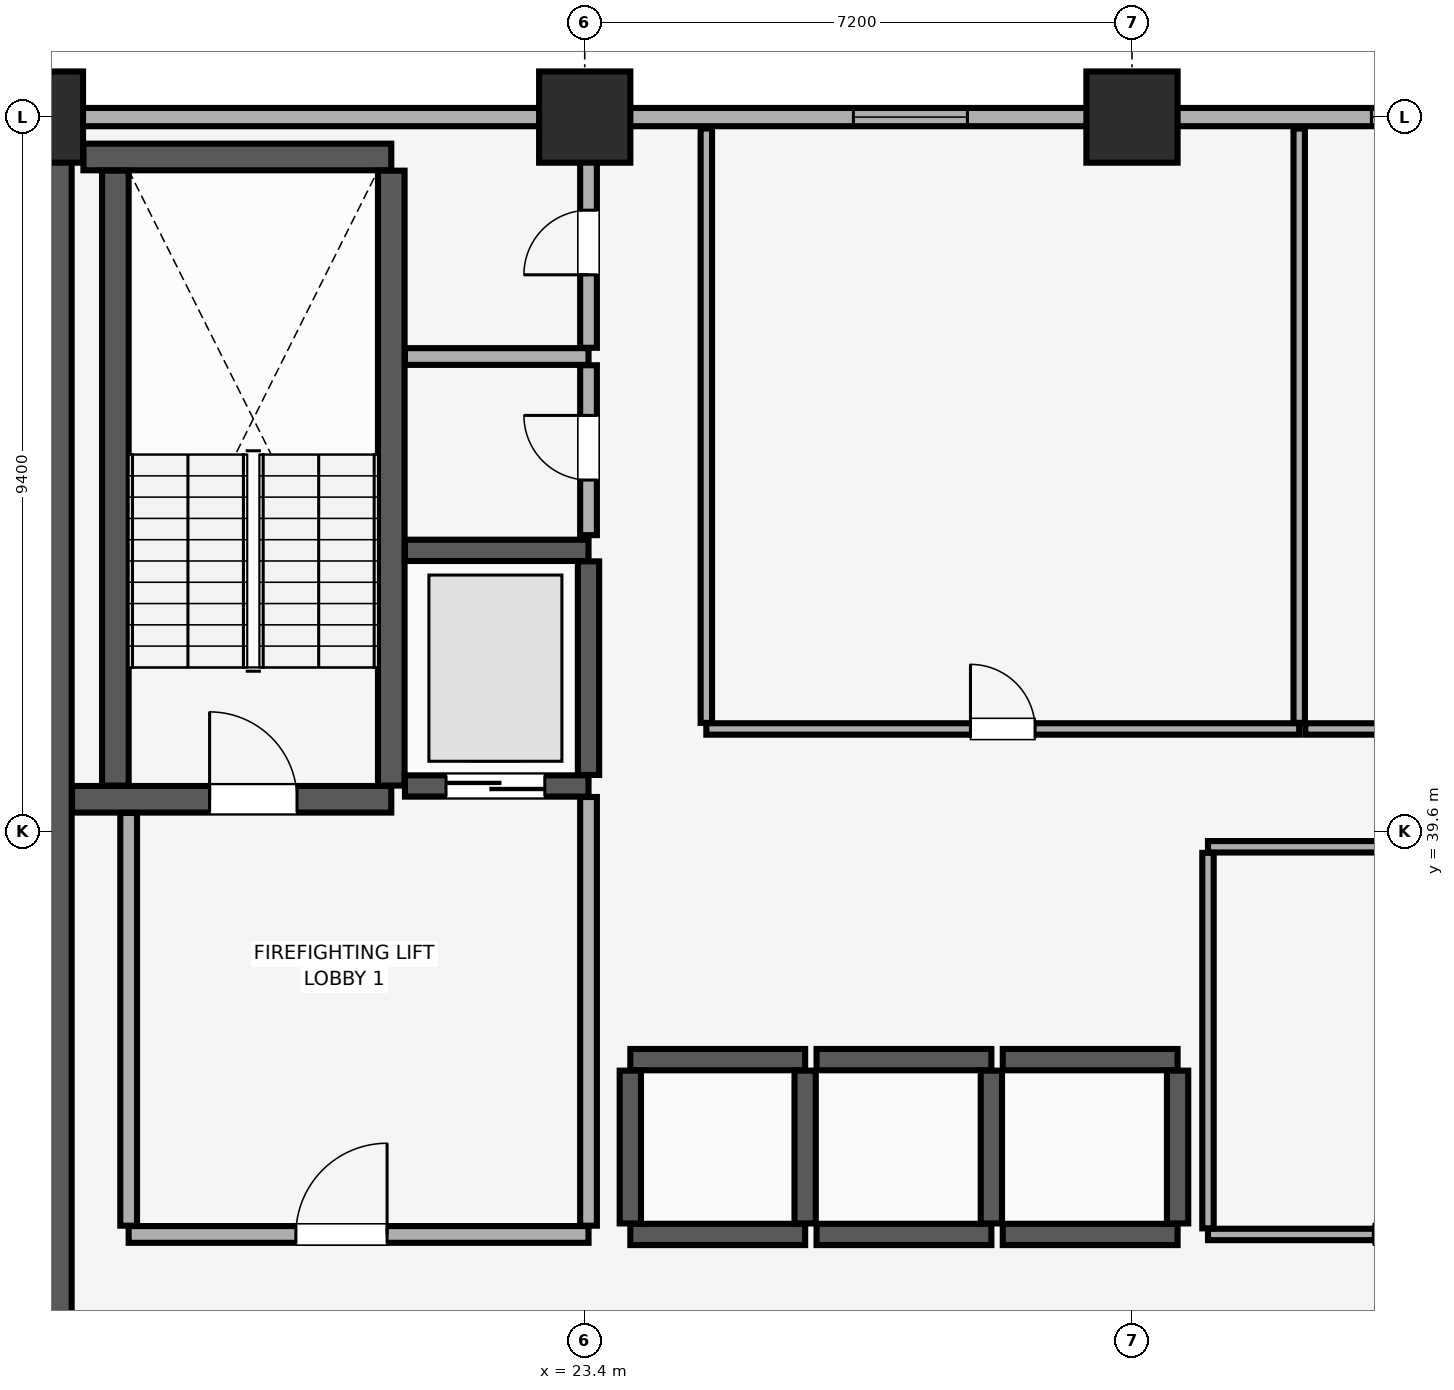
"""IFC4 building model, lengths in metres.
Left out: names, types, materials, properties, quantities, classifications, styles, units other than length and angle.
Written with IfcOpenShell. Run it as: python <this file> out.ifc"""

import sys

from ifc_helpers import new_model, si_unit, direction, frame, frame_2d, origin, origin_2d, place, context, subcontext, project, spatial, rectangle, extrude, element, fill, save


model = new_model("IFC4")
c1 = context("Model", 3, precision=1e-05, world=origin(), true_north=direction((0.0, 1.0)))
c2 = subcontext(c1, "Body", "Model", "MODEL_VIEW")
j1 = project(units=[si_unit("LENGTHUNIT", "METRE"), si_unit("PLANEANGLEUNIT", "RADIAN")], contexts=[c1])
p1 = place(None, origin())
s1 = spatial("IfcSite", under=j1, at=p1, CompositionType="ELEMENT")
p2 = place(p1, origin())
s2 = spatial("IfcBuilding", under=s1, at=p2, CompositionType="ELEMENT")
p3 = place(p2, frame((0.0, 0.0, 135.35)))
s3 = spatial("IfcBuildingStorey", under=s2, at=p3, CompositionType="ELEMENT", Elevation=135.35)
for number, where, z_axis, x_axis in (
    (1, (16.2, 49.0, 0.0), (0.0, 0.0, 1.0), (1.0, 0.0, 0.0)),
    (2, (23.4, 49.0, 0.0), (0.0, 0.0, 1.0), (1.0, 0.0, 0.0)),
    (3, (30.6, 49.0, 0.0), (0.0, 0.0, 1.0), (1.0, 0.0, 0.0)),
):
    element("IfcColumn", number, at=place(p3, frame(where, z_axis=z_axis, x_axis=x_axis)), inside=s3, PredefinedType="COLUMN", context=c2, shape_type="SweptSolid", body=[
        extrude(rectangle(XDim=1.2, YDim=1.2, at=origin_2d()), origin(), (0.0, 0.0, 1.0), 3.56),
    ])
p4 = place(p3, frame((77.0, 49.0, 0.0), z_axis=(0.0, 0.0, 1.0), x_axis=(-1.0, 0.0, 0.0)))
e4 = element("IfcWall", 4, at=p4, inside=s3, PredefinedType="SOLIDWALL", context=c2, shape_type="SweptSolid", body=[
    extrude(rectangle(XDim=70.0, YDim=0.24, at=frame_2d((35.0, 0.0))), origin(), (0.0, 0.0, 1.0), 2.61),
])
p5 = place(p4, frame((63.7, 0.0, 0.85)))
e5 = element("IfcOpeningElement", 5, at=p5, cuts=e4, PredefinedType="OPENING", context=c2, shape_type="SweptSolid", body=[
    extrude(rectangle(XDim=3.0, YDim=1.5, at=frame_2d((1.5, 0.75))), frame((0.0, 0.13, 0.0), z_axis=(0.0, -1.0, 0.0), x_axis=(1.0, 0.0, 0.0)), (0.0, 0.0, 1.0), 0.26),
])
p6 = place(p4, frame((3.3, 0.0, 0.85)))
e6 = element("IfcOpeningElement", 6, at=p6, cuts=e4, PredefinedType="OPENING", context=c2, shape_type="SweptSolid", body=[
    extrude(rectangle(XDim=3.0, YDim=1.5, at=frame_2d((1.5, 0.75))), frame((0.0, 0.13, 0.0), z_axis=(0.0, -1.0, 0.0), x_axis=(1.0, 0.0, 0.0)), (0.0, 0.0, 1.0), 0.26),
])
p7 = place(p4, frame((48.565, 0.0, 0.9)))
e7 = element("IfcOpeningElement", 7, at=p7, cuts=e4, PredefinedType="OPENING", context=c2, shape_type="SweptSolid", body=[
    extrude(rectangle(XDim=1.5, YDim=1.4, at=frame_2d((0.75, 0.7))), frame((0.0, 0.13, 0.0), z_axis=(0.0, -1.0, 0.0), x_axis=(1.0, 0.0, 0.0)), (0.0, 0.0, 1.0), 0.26),
])
p8 = place(p4, frame((41.75, 0.0, 0.9)))
e8 = element("IfcOpeningElement", 8, at=p8, cuts=e4, PredefinedType="OPENING", context=c2, shape_type="SweptSolid", body=[
    extrude(rectangle(XDim=1.5, YDim=1.4, at=frame_2d((0.75, 0.7))), frame((0.0, 0.13, 0.0), z_axis=(0.0, -1.0, 0.0), x_axis=(1.0, 0.0, 0.0)), (0.0, 0.0, 1.0), 0.26),
])
p9 = place(p4, frame((25.3, 0.0, 0.9)))
e9 = element("IfcOpeningElement", 9, at=p9, cuts=e4, PredefinedType="OPENING", context=c2, shape_type="SweptSolid", body=[
    extrude(rectangle(XDim=1.5, YDim=1.4, at=frame_2d((0.75, 0.7))), frame((0.0, 0.13, 0.0), z_axis=(0.0, -1.0, 0.0), x_axis=(1.0, 0.0, 0.0)), (0.0, 0.0, 1.0), 0.26),
])
p10 = place(p4, frame((20.685, 0.0, 0.9)))
e10 = element("IfcOpeningElement", 10, at=p10, cuts=e4, PredefinedType="OPENING", context=c2, shape_type="SweptSolid", body=[
    extrude(rectangle(XDim=1.5, YDim=1.4, at=frame_2d((0.75, 0.7))), frame((0.0, 0.13, 0.0), z_axis=(0.0, -1.0, 0.0), x_axis=(1.0, 0.0, 0.0)), (0.0, 0.0, 1.0), 0.26),
])
p11 = place(p3, frame((16.2, 29.4, 0.0), z_axis=(0.0, 0.0, 1.0), x_axis=(0.0, 1.0, 0.0)))
e11 = element("IfcWall", 11, at=p11, inside=s3, PredefinedType="SHEAR", context=c2, shape_type="SweptSolid", body=[
    extrude(rectangle(XDim=19.2, YDim=0.9, at=frame_2d((9.6, 0.0))), origin(), (0.0, 0.0, 1.0), 3.56),
])
p12 = place(p3, frame((16.655, 40.025, 0.0), z_axis=(0.0, 0.0, 1.0), x_axis=(1.0, 0.0, 0.0)))
e12 = element("IfcWall", 12, at=p12, inside=s3, PredefinedType="SHEAR", context=c2, shape_type="SweptSolid", body=[
    extrude(rectangle(XDim=4.2, YDim=0.35, at=frame_2d((2.1, 0.0))), origin(), (0.0, 0.0, 1.0), 3.56),
])
p13 = place(p12, frame((1.81, 0.0, 0.0)))
e13 = element("IfcOpeningElement", 13, at=p13, cuts=e12, PredefinedType="OPENING", context=c2, shape_type="SweptSolid", body=[
    extrude(rectangle(XDim=1.15, YDim=2.15, at=frame_2d((0.575, 1.075))), frame((0.0, 0.185, 0.0), z_axis=(0.0, -1.0, 0.0), x_axis=(1.0, 0.0, 0.0)), (0.0, 0.0, 1.0), 0.37),
])
p14 = place(p3, frame((16.805, 48.475, 0.0), z_axis=(0.0, 0.0, 1.0), x_axis=(1.0, 0.0, 0.0)))
e14 = element("IfcWall", 14, at=p14, inside=s3, PredefinedType="SHEAR", context=c2, shape_type="SweptSolid", body=[
    extrude(rectangle(XDim=4.05, YDim=0.35, at=frame_2d((2.025, 0.0))), origin(), (0.0, 0.0, 1.0), 3.56),
])
for number, where, z_axis, x_axis in (
    (15, (17.225, 40.205, 0.0), (0.0, 0.0, 1.0), (0.0, 1.0, 0.0)),
    (16, (20.855, 40.205, 0.0), (0.0, 0.0, 1.0), (0.0, 1.0, 0.0)),
):
    element("IfcWall", number, at=place(p3, frame(where, z_axis=z_axis, x_axis=x_axis)), inside=s3, PredefinedType="SHEAR", context=c2, shape_type="SweptSolid", body=[
        extrude(rectangle(XDim=8.09, YDim=0.35, at=frame_2d((4.045, 0.0))), origin(), (0.0, 0.0, 1.0), 3.56),
    ])
for number, where, z_axis, x_axis in (
    (17, (24.0, 34.3, 0.0), (0.0, 0.0, 1.0), (1.0, 0.0, 0.0)),
    (18, (24.0, 36.6, 0.0), (0.0, 0.0, 1.0), (1.0, 0.0, 0.0)),
):
    element("IfcWall", number, at=place(p3, frame(where, z_axis=z_axis, x_axis=x_axis)), inside=s3, PredefinedType="SHEAR", context=c2, shape_type="SweptSolid", body=[
        extrude(rectangle(XDim=2.3, YDim=0.28, at=frame_2d((1.15, 0.0))), origin(), (0.0, 0.0, 1.0), 3.56),
    ])
for number, where, z_axis, x_axis in (
    (19, (24.0, 34.445, 0.0), (0.0, 0.0, 1.0), (0.0, 1.0, 0.0)),
    (20, (26.3, 34.445, 0.0), (0.0, 0.0, 1.0), (0.0, 1.0, 0.0)),
):
    element("IfcWall", number, at=place(p3, frame(where, z_axis=z_axis, x_axis=x_axis)), inside=s3, PredefinedType="SHEAR", context=c2, shape_type="SweptSolid", body=[
        extrude(rectangle(XDim=2.01, YDim=0.28, at=frame_2d((1.005, 0.0))), origin(), (0.0, 0.0, 1.0), 3.56),
    ])
for number, where, z_axis, x_axis in (
    (21, (26.45, 34.3, 0.0), (0.0, 0.0, 1.0), (1.0, 0.0, 0.0)),
    (22, (26.45, 36.6, 0.0), (0.0, 0.0, 1.0), (1.0, 0.0, 0.0)),
):
    element("IfcWall", number, at=place(p3, frame(where, z_axis=z_axis, x_axis=x_axis)), inside=s3, PredefinedType="SHEAR", context=c2, shape_type="SweptSolid", body=[
        extrude(rectangle(XDim=2.3, YDim=0.28, at=frame_2d((1.15, 0.0))), origin(), (0.0, 0.0, 1.0), 3.56),
    ])
p15 = place(p3, frame((28.75, 34.445, 0.0), z_axis=(0.0, 0.0, 1.0), x_axis=(0.0, 1.0, 0.0)))
e23 = element("IfcWall", 23, at=p15, inside=s3, PredefinedType="SHEAR", context=c2, shape_type="SweptSolid", body=[
    extrude(rectangle(XDim=2.01, YDim=0.28, at=frame_2d((1.005, 0.0))), origin(), (0.0, 0.0, 1.0), 3.56),
])
for number, where, z_axis, x_axis in (
    (24, (28.9, 34.3, 0.0), (0.0, 0.0, 1.0), (1.0, 0.0, 0.0)),
    (25, (28.9, 36.6, 0.0), (0.0, 0.0, 1.0), (1.0, 0.0, 0.0)),
):
    element("IfcWall", number, at=place(p3, frame(where, z_axis=z_axis, x_axis=x_axis)), inside=s3, PredefinedType="SHEAR", context=c2, shape_type="SweptSolid", body=[
        extrude(rectangle(XDim=2.3, YDim=0.28, at=frame_2d((1.15, 0.0))), origin(), (0.0, 0.0, 1.0), 3.56),
    ])
p16 = place(p3, frame((31.2, 34.445, 0.0), z_axis=(0.0, 0.0, 1.0), x_axis=(0.0, 1.0, 0.0)))
e26 = element("IfcWall", 26, at=p16, inside=s3, PredefinedType="SHEAR", context=c2, shape_type="SweptSolid", body=[
    extrude(rectangle(XDim=2.01, YDim=0.28, at=frame_2d((1.005, 0.0))), origin(), (0.0, 0.0, 1.0), 3.56),
])
p17 = place(p3, frame((21.035, 40.2, 0.0), z_axis=(0.0, 0.0, 1.0), x_axis=(1.0, 0.0, 0.0)))
e27 = element("IfcWall", 27, at=p17, inside=s3, PredefinedType="SHEAR", context=c2, shape_type="SweptSolid", body=[
    extrude(rectangle(XDim=2.415, YDim=0.28, at=frame_2d((1.208, 0.0))), origin(), (0.0, 0.0, 1.0), 3.56),
])
p18 = place(p17, frame((0.54, 0.0, 0.0)))
e28 = element("IfcOpeningElement", 28, at=p18, cuts=e27, PredefinedType="OPENING", context=c2, shape_type="SweptSolid", body=[
    extrude(rectangle(XDim=1.3, YDim=2.3, at=frame_2d((0.65, 1.15))), frame((0.0, 0.15, 0.0), z_axis=(0.0, -1.0, 0.0), x_axis=(1.0, 0.0, 0.0)), (0.0, 0.0, 1.0), 0.3),
])
p19 = place(p3, frame((21.035, 43.3, 0.0), z_axis=(0.0, 0.0, 1.0), x_axis=(1.0, 0.0, 0.0)))
e29 = element("IfcWall", 29, at=p19, inside=s3, PredefinedType="SHEAR", context=c2, shape_type="SweptSolid", body=[
    extrude(rectangle(XDim=2.415, YDim=0.28, at=frame_2d((1.208, 0.0))), origin(), (0.0, 0.0, 1.0), 3.56),
])
p20 = place(p3, frame((23.45, 40.345, 0.0), z_axis=(0.0, 0.0, 1.0), x_axis=(0.0, 1.0, 0.0)))
e30 = element("IfcWall", 30, at=p20, inside=s3, PredefinedType="SHEAR", context=c2, shape_type="SweptSolid", body=[
    extrude(rectangle(XDim=2.81, YDim=0.28, at=frame_2d((1.405, 0.0))), origin(), (0.0, 0.0, 1.0), 3.56),
])
p21 = place(p3, frame((17.4, 34.3, 0.0), z_axis=(0.0, 0.0, 1.0), x_axis=(1.0, 0.0, 0.0)))
e31 = element("IfcWall", 31, at=p21, inside=s3, PredefinedType="PARTITIONING", context=c2, shape_type="SweptSolid", body=[
    extrude(rectangle(XDim=6.05, YDim=0.22, at=frame_2d((3.025, 0.0))), origin(), (0.0, 0.0, 1.0), 3.56),
])
p22 = place(p21, frame((2.2, 0.0, 0.0)))
e32 = element("IfcOpeningElement", 32, at=p22, cuts=e31, PredefinedType="OPENING", context=c2, shape_type="SweptSolid", body=[
    extrude(rectangle(XDim=1.2, YDim=2.15, at=frame_2d((0.6, 1.075))), frame((0.0, 0.12, 0.0), z_axis=(0.0, -1.0, 0.0), x_axis=(1.0, 0.0, 0.0)), (0.0, 0.0, 1.0), 0.24),
])
p23 = place(p3, frame((17.4, 34.415, 0.0), z_axis=(0.0, 0.0, 1.0), x_axis=(0.0, 1.0, 0.0)))
e33 = element("IfcWall", 33, at=p23, inside=s3, PredefinedType="PARTITIONING", context=c2, shape_type="SweptSolid", body=[
    extrude(rectangle(XDim=5.43, YDim=0.22, at=frame_2d((2.715, 0.0))), origin(), (0.0, 0.0, 1.0), 3.56),
])
p24 = place(p3, frame((23.45, 34.415, 0.0), z_axis=(0.0, 0.0, 1.0), x_axis=(0.0, 1.0, 0.0)))
e34 = element("IfcWall", 34, at=p24, inside=s3, PredefinedType="PARTITIONING", context=c2, shape_type="SweptSolid", body=[
    extrude(rectangle(XDim=5.64, YDim=0.22, at=frame_2d((2.82, 0.0))), origin(), (0.0, 0.0, 1.0), 3.56),
])
p25 = place(p3, frame((21.035, 45.85, 0.0), z_axis=(0.0, 0.0, 1.0), x_axis=(1.0, 0.0, 0.0)))
e35 = element("IfcWall", 35, at=p25, inside=s3, PredefinedType="PARTITIONING", context=c2, shape_type="SweptSolid", body=[
    extrude(rectangle(XDim=2.415, YDim=0.22, at=frame_2d((1.208, 0.0))), origin(), (0.0, 0.0, 1.0), 3.56),
])
p26 = place(p3, frame((23.45, 43.5, 0.0), z_axis=(0.0, 0.0, 1.0), x_axis=(0.0, 1.0, 0.0)))
e36 = element("IfcWall", 36, at=p26, inside=s3, PredefinedType="PARTITIONING", context=c2, shape_type="SweptSolid", body=[
    extrude(rectangle(XDim=2.235, YDim=0.22, at=frame_2d((1.118, 0.0))), origin(), (0.0, 0.0, 1.0), 3.56),
])
p27 = place(p26, frame((0.725, 0.0, 0.0)))
e37 = element("IfcOpeningElement", 37, at=p27, cuts=e36, PredefinedType="OPENING", context=c2, shape_type="SweptSolid", body=[
    extrude(rectangle(XDim=0.85, YDim=2.1, at=frame_2d((0.425, 1.05))), frame((0.0, 0.12, 0.0), z_axis=(0.0, -1.0, 0.0), x_axis=(1.0, 0.0, 0.0)), (0.0, 0.0, 1.0), 0.24),
])
p28 = place(p3, frame((23.45, 45.965, 0.0), z_axis=(0.0, 0.0, 1.0), x_axis=(0.0, 1.0, 0.0)))
e38 = element("IfcWall", 38, at=p28, inside=s3, PredefinedType="PARTITIONING", context=c2, shape_type="SweptSolid", body=[
    extrude(rectangle(XDim=2.885, YDim=0.22, at=frame_2d((1.442, 0.0))), origin(), (0.0, 0.0, 1.0), 3.56),
])
p29 = place(p28, frame((0.96, 0.0, 0.0)))
e39 = element("IfcOpeningElement", 39, at=p29, cuts=e38, PredefinedType="OPENING", context=c2, shape_type="SweptSolid", body=[
    extrude(rectangle(XDim=0.85, YDim=2.1, at=frame_2d((0.425, 1.05))), frame((0.0, 0.12, 0.0), z_axis=(0.0, -1.0, 0.0), x_axis=(1.0, 0.0, 0.0)), (0.0, 0.0, 1.0), 0.24),
])
p30 = place(p3, frame((31.6, 34.3, 0.0), z_axis=(0.0, 0.0, 1.0), x_axis=(1.0, 0.0, 0.0)))
e40 = element("IfcWall", 40, at=p30, inside=s3, PredefinedType="PARTITIONING", context=c2, shape_type="SweptSolid", body=[
    extrude(rectangle(XDim=5.2, YDim=0.15, at=frame_2d((2.6, 0.0))), origin(), (0.0, 0.0, 1.0), 3.56),
])
p31 = place(p30, frame((2.175, 0.0, 0.0)))
e41 = element("IfcOpeningElement", 41, at=p31, cuts=e40, PredefinedType="OPENING", context=c2, shape_type="SweptSolid", body=[
    extrude(rectangle(XDim=0.85, YDim=2.1, at=frame_2d((0.425, 1.05))), frame((0.0, 0.085, 0.0), z_axis=(0.0, -1.0, 0.0), x_axis=(1.0, 0.0, 0.0)), (0.0, 0.0, 1.0), 0.17),
])
p32 = place(p3, frame((31.6, 39.4, 0.0), z_axis=(0.0, 0.0, 1.0), x_axis=(1.0, 0.0, 0.0)))
e42 = element("IfcWall", 42, at=p32, inside=s3, PredefinedType="PARTITIONING", context=c2, shape_type="SweptSolid", body=[
    extrude(rectangle(XDim=5.2, YDim=0.15, at=frame_2d((2.6, 0.0))), origin(), (0.0, 0.0, 1.0), 3.56),
])
p33 = place(p3, frame((31.6, 34.38, 0.0), z_axis=(0.0, 0.0, 1.0), x_axis=(0.0, 1.0, 0.0)))
e43 = element("IfcWall", 43, at=p33, inside=s3, PredefinedType="PARTITIONING", context=c2, shape_type="SweptSolid", body=[
    extrude(rectangle(XDim=4.94, YDim=0.15, at=frame_2d((2.47, 0.0))), origin(), (0.0, 0.0, 1.0), 3.56),
])
p34 = place(p3, frame((25.0, 40.95, 0.0), z_axis=(0.0, 0.0, 1.0), x_axis=(1.0, 0.0, 0.0)))
e44 = element("IfcWall", 44, at=p34, inside=s3, PredefinedType="PARTITIONING", context=c2, shape_type="SweptSolid", body=[
    extrude(rectangle(XDim=7.8, YDim=0.15, at=frame_2d((3.9, 0.0))), origin(), (0.0, 0.0, 1.0), 3.56),
])
p35 = place(p34, frame((3.475, 0.0, 0.0)))
e45 = element("IfcOpeningElement", 45, at=p35, cuts=e44, PredefinedType="OPENING", context=c2, shape_type="SweptSolid", body=[
    extrude(rectangle(XDim=0.85, YDim=2.1, at=frame_2d((0.425, 1.05))), frame((0.0, 0.085, 0.0), z_axis=(0.0, -1.0, 0.0), x_axis=(1.0, 0.0, 0.0)), (0.0, 0.0, 1.0), 0.17),
])
for number, where, z_axis, x_axis in (
    (46, (25.0, 41.03, 0.0), (0.0, 0.0, 1.0), (0.0, 1.0, 0.0)),
    (47, (32.8, 41.03, 0.0), (0.0, 0.0, 1.0), (0.0, 1.0, 0.0)),
):
    element("IfcWall", number, at=place(p3, frame(where, z_axis=z_axis, x_axis=x_axis)), inside=s3, PredefinedType="PARTITIONING", context=c2, shape_type="SweptSolid", body=[
        extrude(rectangle(XDim=7.82, YDim=0.15, at=frame_2d((3.91, 0.0))), origin(), (0.0, 0.0, 1.0), 3.56),
    ])
p36 = place(p3, frame((32.88, 40.95, 0.0), z_axis=(0.0, 0.0, 1.0), x_axis=(1.0, 0.0, 0.0)))
e48 = element("IfcWall", 48, at=p36, inside=s3, PredefinedType="PARTITIONING", context=c2, shape_type="SweptSolid", body=[
    extrude(rectangle(XDim=3.32, YDim=0.15, at=frame_2d((1.66, 0.0))), origin(), (0.0, 0.0, 1.0), 3.56),
])
p37 = place(p36, frame((1.12, 0.0, 0.0)))
e49 = element("IfcOpeningElement", 49, at=p37, cuts=e48, PredefinedType="OPENING", context=c2, shape_type="SweptSolid", body=[
    extrude(rectangle(XDim=1.0, YDim=2.15, at=frame_2d((0.5, 1.075))), frame((0.0, 0.085, 0.0), z_axis=(0.0, -1.0, 0.0), x_axis=(1.0, 0.0, 0.0)), (0.0, 0.0, 1.0), 0.17),
])
p38 = place(p7, origin())
e50 = element("IfcWindow", 50, at=p38, inside=s3, PartitioningType="SINGLE_PANEL", PredefinedType="WINDOW", context=c2, shape_type="SweptSolid", body=[
    extrude(rectangle(XDim=1.5, YDim=1.4, at=frame_2d((0.75, 0.7))), frame((0.0, 0.03, 0.0), z_axis=(0.0, -1.0, 0.0), x_axis=(1.0, 0.0, 0.0)), (0.0, 0.0, 1.0), 0.06),
])
fill(e7, e50)
p39 = place(p8, origin())
e51 = element("IfcWindow", 51, at=p39, inside=s3, PartitioningType="SINGLE_PANEL", PredefinedType="WINDOW", context=c2, shape_type="SweptSolid", body=[
    extrude(rectangle(XDim=1.5, YDim=1.4, at=frame_2d((0.75, 0.7))), frame((0.0, 0.03, 0.0), z_axis=(0.0, -1.0, 0.0), x_axis=(1.0, 0.0, 0.0)), (0.0, 0.0, 1.0), 0.06),
])
fill(e8, e51)
p40 = place(p13, origin())
e52 = element("IfcDoor", 52, at=p40, inside=s3, OperationType="SINGLE_SWING_LEFT", PredefinedType="DOOR", context=c2, shape_type="SweptSolid", body=[
    extrude(rectangle(XDim=1.15, YDim=2.15, at=frame_2d((0.575, 1.075))), frame((0.0, 0.025, 0.0), z_axis=(0.0, -1.0, 0.0), x_axis=(1.0, 0.0, 0.0)), (0.0, 0.0, 1.0), 0.05),
])
fill(e13, e52)
p41 = place(p18, origin())
e53 = element("IfcDoor", 53, at=p41, inside=s3, OperationType="DOUBLE_DOOR_SLIDING", PredefinedType="DOOR", context=c2, shape_type="SweptSolid", body=[
    extrude(rectangle(XDim=1.3, YDim=2.3, at=frame_2d((0.65, 1.15))), frame((0.0, 0.025, 0.0), z_axis=(0.0, -1.0, 0.0), x_axis=(1.0, 0.0, 0.0)), (0.0, 0.0, 1.0), 0.05),
])
fill(e28, e53)
p42 = place(p22, origin())
e54 = element("IfcDoor", 54, at=p42, inside=s3, OperationType="SINGLE_SWING_RIGHT", PredefinedType="DOOR", context=c2, shape_type="SweptSolid", body=[
    extrude(rectangle(XDim=1.2, YDim=2.15, at=frame_2d((0.6, 1.075))), frame((0.0, 0.025, 0.0), z_axis=(0.0, -1.0, 0.0), x_axis=(1.0, 0.0, 0.0)), (0.0, 0.0, 1.0), 0.05),
])
fill(e32, e54)
p43 = place(p27, origin())
e55 = element("IfcDoor", 55, at=p43, inside=s3, OperationType="SINGLE_SWING_RIGHT", PredefinedType="DOOR", context=c2, shape_type="SweptSolid", body=[
    extrude(rectangle(XDim=0.85, YDim=2.1, at=frame_2d((0.425, 1.05))), frame((0.0, 0.025, 0.0), z_axis=(0.0, -1.0, 0.0), x_axis=(1.0, 0.0, 0.0)), (0.0, 0.0, 1.0), 0.05),
])
fill(e37, e55)
p44 = place(p29, origin())
e56 = element("IfcDoor", 56, at=p44, inside=s3, OperationType="SINGLE_SWING_LEFT", PredefinedType="DOOR", context=c2, shape_type="SweptSolid", body=[
    extrude(rectangle(XDim=0.85, YDim=2.1, at=frame_2d((0.425, 1.05))), frame((0.0, 0.025, 0.0), z_axis=(0.0, -1.0, 0.0), x_axis=(1.0, 0.0, 0.0)), (0.0, 0.0, 1.0), 0.05),
])
fill(e39, e56)
p45 = place(p31, origin())
e57 = element("IfcDoor", 57, at=p45, inside=s3, OperationType="SINGLE_SWING_RIGHT", PredefinedType="DOOR", context=c2, shape_type="SweptSolid", body=[
    extrude(rectangle(XDim=0.85, YDim=2.1, at=frame_2d((0.425, 1.05))), frame((0.0, 0.025, 0.0), z_axis=(0.0, -1.0, 0.0), x_axis=(1.0, 0.0, 0.0)), (0.0, 0.0, 1.0), 0.05),
])
fill(e41, e57)
p46 = place(p35, origin())
e58 = element("IfcDoor", 58, at=p46, inside=s3, OperationType="SINGLE_SWING_LEFT", PredefinedType="DOOR", context=c2, shape_type="SweptSolid", body=[
    extrude(rectangle(XDim=0.85, YDim=2.1, at=frame_2d((0.425, 1.05))), frame((0.0, 0.025, 0.0), z_axis=(0.0, -1.0, 0.0), x_axis=(1.0, 0.0, 0.0)), (0.0, 0.0, 1.0), 0.05),
])
fill(e45, e58)
save(model, sys.argv[1])
